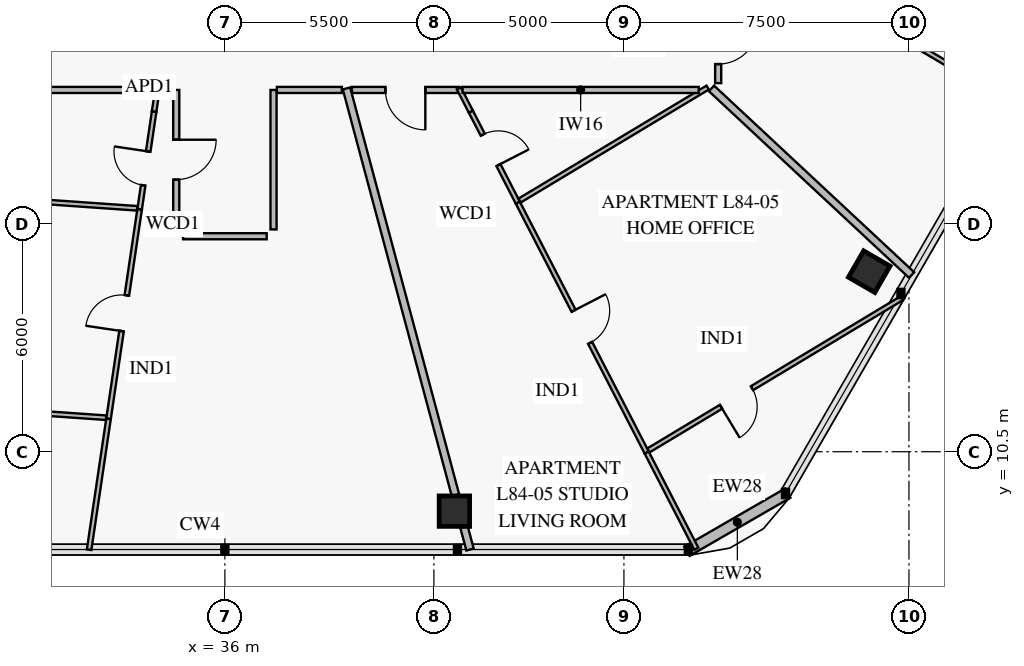
"""IFC4 building model, lengths in metres.
Left out: names, types, materials, properties, quantities, classifications, styles, units other than length and angle.
Written with IfcOpenShell. Run it as: python <this file> out.ifc"""

import sys

from ifc_helpers import new_model, si_unit, direction, frame, frame_2d, origin, origin_2d, place, context, subcontext, project, spatial, rectangle, extrude, element, fill, save


model = new_model("IFC4")
c1 = context("Model", 3, precision=1e-05, world=origin(), true_north=direction((0.0, 1.0)))
c2 = subcontext(c1, "Body", "Model", "MODEL_VIEW")
j1 = project(units=[si_unit("LENGTHUNIT", "METRE"), si_unit("PLANEANGLEUNIT", "RADIAN")], contexts=[c1])
p1 = place(None, origin())
s1 = spatial("IfcSite", under=j1, at=p1, CompositionType="ELEMENT")
p2 = place(p1, origin())
s2 = spatial("IfcBuilding", under=s1, at=p2, CompositionType="ELEMENT")
p3 = place(p2, frame((0.0, 0.0, 331.0)))
s3 = spatial("IfcBuildingStorey", under=s2, at=p3, CompositionType="ELEMENT", Elevation=331.0)
for number, where, z_axis, x_axis in (
    (1, (42.039, 8.936, 0.0), (0.0, 0.0, 1.0), (1.0, 0.0, 0.0)),
    (2, (52.955, 15.238, 0.0), (0.0, 0.0, 1.0), (0.5, 0.866, 0.0)),
):
    element("IfcColumn", number, at=place(p3, frame(where, z_axis=z_axis, x_axis=x_axis)), inside=s3, PredefinedType="COLUMN", context=c2, shape_type="SweptSolid", body=[
        extrude(rectangle(XDim=0.8, YDim=0.8, at=origin_2d()), origin(), (0.0, 0.0, 1.0), 3.55),
    ])
p4 = place(p3, frame((50.811, 9.411, 0.0), z_axis=(0.0, 0.0, 1.0), x_axis=(-0.866023752521, -0.50000286006, 0.0)))
e3 = element("IfcWall", 3, at=p4, inside=s3, PredefinedType="SOLIDWALL", context=c2, shape_type="SweptSolid", body=[
    extrude(rectangle(XDim=3.065, YDim=0.28, at=frame_2d((1.532, 0.0))), origin(), (0.0, 0.0, 1.0), 3.55),
])
p5 = place(p3, frame((34.138, 19.45, 0.0), z_axis=(0.0, 0.0, 1.0), x_axis=(-0.146698230723, -0.989181292334, 0.0)))
e4 = element("IfcWall", 4, at=p5, inside=s3, PredefinedType="PARTITIONING", context=c2, shape_type="SweptSolid", body=[
    extrude(rectangle(XDim=2.603, YDim=0.12, at=frame_2d((1.301, 0.0))), origin(), (0.0, 0.0, 1.0), 3.55),
])
p6 = place(p5, frame((1.06, 0.0, 0.0)))
e5 = element("IfcOpeningElement", 5, at=p6, cuts=e4, PredefinedType="OPENING", context=c2, shape_type="SweptSolid", body=[
    extrude(rectangle(XDim=0.9, YDim=2.1, at=frame_2d((0.45, 1.05))), frame((0.0, 0.072, 0.0), z_axis=(0.0, -1.0, 0.0), x_axis=(1.0, 0.0, 0.0)), (0.0, 0.0, 1.0), 0.144),
])
p7 = place(p3, frame((33.756, 16.875, 0.0), z_axis=(0.0, 0.0, 1.0), x_axis=(-0.146775791573, -0.989169786744, 0.0)))
e6 = element("IfcWall", 6, at=p7, inside=s3, PredefinedType="PARTITIONING", context=c2, shape_type="SweptSolid", body=[
    extrude(rectangle(XDim=5.571, YDim=0.12, at=frame_2d((2.785, 0.0))), origin(), (0.0, 0.0, 1.0), 3.2),
])
p8 = place(p7, frame((2.285, 0.0, 0.0)))
e7 = element("IfcOpeningElement", 7, at=p8, cuts=e6, PredefinedType="OPENING", context=c2, shape_type="SweptSolid", body=[
    extrude(rectangle(XDim=0.95, YDim=2.1, at=frame_2d((0.475, 1.05))), frame((0.0, 0.072, 0.0), z_axis=(0.0, -1.0, 0.0), x_axis=(1.0, 0.0, 0.0)), (0.0, 0.0, 1.0), 0.144),
])
p9 = place(p3, frame((27.512, 11.77, 0.0), z_axis=(0.0, 0.0, 1.0), x_axis=(0.997563205134, -0.06976855856, 0.0)))
e8 = element("IfcWall", 8, at=p9, inside=s3, PredefinedType="PARTITIONING", context=c2, shape_type="SweptSolid", body=[
    extrude(rectangle(XDim=5.375, YDim=0.12, at=frame_2d((2.688, 0.0))), origin(), (0.0, 0.0, 1.0), 3.0),
])
p10 = place(p9, frame((2.297, 0.0, 0.0)))
e9 = element("IfcOpeningElement", 9, at=p10, cuts=e8, PredefinedType="OPENING", context=c2, shape_type="SweptSolid", body=[
    extrude(rectangle(XDim=0.95, YDim=2.1, at=frame_2d((0.475, 1.05))), frame((0.0, 0.072, 0.0), z_axis=(0.0, -1.0, 0.0), x_axis=(1.0, 0.0, 0.0)), (0.0, 0.0, 1.0), 0.144),
])
p11 = place(p3, frame((34.72, 20.02, 0.0), z_axis=(0.0, 0.0, 1.0), x_axis=(0.0, -1.0, 0.0)))
e10 = element("IfcWall", 10, at=p11, inside=s3, PredefinedType="PARTITIONING", context=c2, shape_type="SweptSolid", body=[
    extrude(rectangle(XDim=3.67, YDim=0.16, at=frame_2d((1.835, 0.0))), origin(), (0.0, 0.0, 1.0), 3.55),
])
p12 = place(p11, frame((1.31, 0.0, 0.0)))
e11 = element("IfcOpeningElement", 11, at=p12, cuts=e10, PredefinedType="OPENING", context=c2, shape_type="SweptSolid", body=[
    extrude(rectangle(XDim=1.05, YDim=2.15, at=frame_2d((0.525, 1.075))), frame((0.0, 0.092, 0.0), z_axis=(0.0, -1.0, 0.0), x_axis=(1.0, 0.0, 0.0)), (0.0, 0.0, 1.0), 0.184),
])
p13 = place(p3, frame((42.472, 19.45, 0.0), z_axis=(0.0, 0.0, 1.0), x_axis=(0.458327108515, -0.888783585357, 0.0)))
e12 = element("IfcWall", 12, at=p13, inside=s3, PredefinedType="PARTITIONING", context=c2, shape_type="SweptSolid", body=[
    extrude(rectangle(XDim=2.698, YDim=0.12, at=frame_2d((1.349, 0.0))), origin(), (0.0, 0.0, 1.0), 3.55),
])
p14 = place(p13, frame((0.683, 0.0, 0.0)))
e13 = element("IfcOpeningElement", 13, at=p14, cuts=e12, PredefinedType="OPENING", context=c2, shape_type="SweptSolid", body=[
    extrude(rectangle(XDim=0.9, YDim=2.1, at=frame_2d((0.45, 1.05))), frame((0.0, 0.072, 0.0), z_axis=(0.0, -1.0, 0.0), x_axis=(1.0, 0.0, 0.0)), (0.0, 0.0, 1.0), 0.144),
])
p15 = place(p3, frame((43.708, 17.052, 0.0), z_axis=(0.0, 0.0, 1.0), x_axis=(0.458373868426, -0.888759470692, 0.0)))
e14 = element("IfcWall", 14, at=p15, inside=s3, PredefinedType="PARTITIONING", context=c2, shape_type="SweptSolid", body=[
    extrude(rectangle(XDim=7.397, YDim=0.12, at=frame_2d((3.698, 0.0))), origin(), (0.0, 0.0, 1.0), 2.97),
])
p16 = place(p15, frame((3.198, 0.0, 0.0)))
e15 = element("IfcOpeningElement", 15, at=p16, cuts=e14, PredefinedType="OPENING", context=c2, shape_type="SweptSolid", body=[
    extrude(rectangle(XDim=0.95, YDim=2.1, at=frame_2d((0.475, 1.05))), frame((0.0, 0.072, 0.0), z_axis=(0.0, -1.0, 0.0), x_axis=(1.0, 0.0, 0.0)), (0.0, 0.0, 1.0), 0.144),
])
p17 = place(p3, frame((47.146, 10.535, 0.0), z_axis=(0.0, 0.0, 1.0), x_axis=(0.857151907368, 0.515063692853, 0.0)))
e16 = element("IfcWall", 16, at=p17, inside=s3, PredefinedType="PARTITIONING", context=c2, shape_type="SweptSolid", body=[
    extrude(rectangle(XDim=7.774, YDim=0.12, at=frame_2d((3.887, 0.0))), origin(), (0.0, 0.0, 1.0), 3.55),
])
p18 = place(p17, frame((2.228, 0.0, 0.0)))
e17 = element("IfcOpeningElement", 17, at=p18, cuts=e16, PredefinedType="OPENING", context=c2, shape_type="SweptSolid", body=[
    extrude(rectangle(XDim=0.95, YDim=2.1, at=frame_2d((0.475, 1.05))), frame((0.0, 0.072, 0.0), z_axis=(0.0, -1.0, 0.0), x_axis=(1.0, 0.0, 0.0)), (0.0, 0.0, 1.0), 0.144),
])
p19 = place(p3, frame((39.343, 20.02, 0.0), z_axis=(0.0, 0.0, 1.0), x_axis=(1.0, 0.0, 0.0)))
e18 = element("IfcWall", 18, at=p19, inside=s3, PredefinedType="PARTITIONING", context=c2, shape_type="SweptSolid", body=[
    extrude(rectangle(XDim=2.812, YDim=0.16, at=frame_2d((1.406, 0.0))), origin(), (0.0, 0.0, 1.0), 3.55),
])
p20 = place(p19, frame((0.881, 0.0, 0.0)))
e19 = element("IfcOpeningElement", 19, at=p20, cuts=e18, PredefinedType="OPENING", context=c2, shape_type="SweptSolid", body=[
    extrude(rectangle(XDim=1.05, YDim=2.15, at=frame_2d((0.525, 1.075))), frame((0.0, 0.092, 0.0), z_axis=(0.0, -1.0, 0.0), x_axis=(1.0, 0.0, 0.0)), (0.0, 0.0, 1.0), 0.184),
])
p21 = place(p3, frame((48.214, 24.742, 0.0), z_axis=(0.0, 0.0, 1.0), x_axis=(0.859681622752, -0.510830213968, 0.0)))
e20 = element("IfcWall", 20, at=p21, inside=s3, PredefinedType="PARTITIONING", context=c2, shape_type="SweptSolid", body=[
    extrude(rectangle(XDim=7.218, YDim=0.12, at=frame_2d((3.609, 0.0))), origin(), (0.0, 0.0, 1.0), 3.2),
])
p22 = place(p21, frame((3.109, 0.0, 0.0)))
e21 = element("IfcOpeningElement", 21, at=p22, cuts=e20, PredefinedType="OPENING", context=c2, shape_type="SweptSolid", body=[
    extrude(rectangle(XDim=0.95, YDim=2.1, at=frame_2d((0.475, 1.05))), frame((0.0, 0.072, 0.0), z_axis=(0.0, -1.0, 0.0), x_axis=(1.0, 0.0, 0.0)), (0.0, 0.0, 1.0), 0.144),
])
p23 = place(p3, frame((48.98, 20.2, 0.0), z_axis=(0.0, 0.0, 1.0), x_axis=(0.0, 1.0, 0.0)))
e22 = element("IfcWall", 22, at=p23, inside=s3, PredefinedType="PARTITIONING", context=c2, shape_type="SweptSolid", body=[
    extrude(rectangle(XDim=2.05, YDim=0.16, at=frame_2d((1.025, 0.0))), origin(), (0.0, 0.0, 1.0), 3.55),
])
p24 = place(p23, frame((0.5, 0.0, 0.0)))
e23 = element("IfcOpeningElement", 23, at=p24, cuts=e22, PredefinedType="OPENING", context=c2, shape_type="SweptSolid", body=[
    extrude(rectangle(XDim=1.05, YDim=2.15, at=frame_2d((0.525, 1.075))), frame((0.0, 0.092, 0.0), z_axis=(0.0, -1.0, 0.0), x_axis=(1.0, 0.0, 0.0)), (0.0, 0.0, 1.0), 0.184),
])
p25 = place(p3, frame((34.229, 20.065, 0.0), z_axis=(0.0, 0.0, 1.0), x_axis=(-0.146918808398, -0.989148554939, 0.0)))
e24 = element("IfcWall", 24, at=p25, inside=s3, PredefinedType="PARTITIONING", context=c2, shape_type="SweptSolid", body=[
    extrude(rectangle(XDim=0.622, YDim=0.12, at=frame_2d((0.311, 0.0))), origin(), (0.0, 0.0, 1.0), 3.55),
])
p26 = place(p3, frame((32.938, 11.365, 0.0), z_axis=(0.0, 0.0, 1.0), x_axis=(-0.146828188144, -0.989162010576, 0.0)))
e25 = element("IfcWall", 25, at=p26, inside=s3, PredefinedType="PARTITIONING", context=c2, shape_type="SweptSolid", body=[
    extrude(rectangle(XDim=3.482, YDim=0.12, at=frame_2d((1.741, 0.0))), origin(), (0.0, 0.0, 1.0), 2.97),
])
p27 = place(p3, frame((29.825, 17.175, 0.0), z_axis=(0.0, 0.0, 1.0), x_axis=(0.997561862018, -0.069787760015, 0.0)))
e26 = element("IfcWall", 26, at=p27, inside=s3, PredefinedType="PARTITIONING", context=c2, shape_type="SweptSolid", body=[
    extrude(rectangle(XDim=3.876, YDim=0.12, at=frame_2d((1.938, 0.0))), origin(), (0.0, 0.0, 1.0), 3.0),
])
p28 = place(p3, frame((39.199, 20.06, 0.0), z_axis=(0.0, 0.0, 1.0), x_axis=(0.258819777011, -0.965925630174, 0.0)))
e27 = element("IfcWall", 27, at=p28, inside=s3, PredefinedType="PARTITIONING", context=c2, shape_type="SweptSolid", body=[
    extrude(rectangle(XDim=11.082, YDim=0.2, at=frame_2d((5.541, 0.0))), origin(), (0.0, 0.0, 1.0), 3.0),
])
p29 = place(p3, frame((42.292, 8.516, 0.0), z_axis=(0.0, 0.0, 1.0), x_axis=(0.258955805871, -0.965889170974, 0.0)))
e28 = element("IfcWall", 28, at=p29, inside=s3, PredefinedType="PARTITIONING", context=c2, shape_type="SweptSolid", body=[
    extrude(rectangle(XDim=0.611, YDim=0.2, at=frame_2d((0.305, 0.0))), origin(), (0.0, 0.0, 1.0), 3.55),
])
p30 = place(p3, frame((42.156, 20.062, 0.0), z_axis=(0.0, 0.0, 1.0), x_axis=(0.458236639111, -0.888830232708, 0.0)))
e29 = element("IfcWall", 29, at=p30, inside=s3, PredefinedType="PARTITIONING", context=c2, shape_type="SweptSolid", body=[
    extrude(rectangle(XDim=0.689, YDim=0.12, at=frame_2d((0.344, 0.0))), origin(), (0.0, 0.0, 1.0), 3.55),
])
p31 = place(p3, frame((47.099, 10.478, 0.0), z_axis=(0.0, 0.0, 1.0), x_axis=(0.458284902265, -0.888805348969, 0.0)))
e30 = element("IfcWall", 30, at=p31, inside=s3, PredefinedType="PARTITIONING", context=c2, shape_type="SweptSolid", body=[
    extrude(rectangle(XDim=2.849, YDim=0.12, at=frame_2d((1.425, 0.0))), origin(), (0.0, 0.0, 1.0), 3.55),
])
p32 = place(p3, frame((43.756, 17.109, 0.0), z_axis=(0.0, 0.0, 1.0), x_axis=(0.857171838157, 0.515030523242, 0.0)))
e31 = element("IfcWall", 31, at=p32, inside=s3, PredefinedType="PARTITIONING", context=c2, shape_type="SweptSolid", body=[
    extrude(rectangle(XDim=5.773, YDim=0.12, at=frame_2d((2.886, 0.0))), origin(), (0.0, 0.0, 1.0), 3.0),
])
p33 = place(p3, frame((48.804, 20.06, 0.0), z_axis=(0.0, 0.0, 1.0), x_axis=(0.731343856779, -0.682008917208, 0.0)))
e32 = element("IfcWall", 32, at=p33, inside=s3, PredefinedType="PARTITIONING", context=c2, shape_type="SweptSolid", body=[
    extrude(rectangle(XDim=7.2, YDim=0.2, at=frame_2d((3.6, 0.0))), origin(), (0.0, 0.0, 1.0), 2.97),
])
p34 = place(p3, frame((54.419, 21.055, 0.0), z_axis=(0.0, 0.0, 1.0), x_axis=(0.859699573503, -0.510800003249, 0.0)))
e33 = element("IfcWall", 33, at=p34, inside=s3, PredefinedType="PARTITIONING", context=c2, shape_type="SweptSolid", body=[
    extrude(rectangle(XDim=2.656, YDim=0.12, at=frame_2d((1.328, 0.0))), origin(), (0.0, 0.0, 1.0), 2.97),
])
p35 = place(p3, frame((37.28, 16.35, 0.0), z_axis=(0.0, 0.0, 1.0), x_axis=(0.0, 1.0, 0.0)))
e34 = element("IfcWall", 34, at=p35, inside=s3, PredefinedType="PARTITIONING", context=c2, shape_type="SweptSolid", body=[
    extrude(rectangle(XDim=3.67, YDim=0.16, at=frame_2d((1.835, 0.0))), origin(), (0.0, 0.0, 1.0), 3.55),
])
p36 = place(p3, frame((34.9, 16.17, 0.0), z_axis=(0.0, 0.0, 1.0), x_axis=(1.0, 0.0, 0.0)))
e35 = element("IfcWall", 35, at=p36, inside=s3, PredefinedType="PARTITIONING", context=c2, shape_type="SweptSolid", body=[
    extrude(rectangle(XDim=2.2, YDim=0.16, at=frame_2d((1.1, 0.0))), origin(), (0.0, 0.0, 1.0), 3.55),
])
p37 = place(p3, frame((37.368, 20.02, 0.0), z_axis=(0.0, 0.0, 1.0), x_axis=(1.0, 0.0, 0.0)))
e36 = element("IfcWall", 36, at=p37, inside=s3, PredefinedType="PARTITIONING", context=c2, shape_type="SweptSolid", body=[
    extrude(rectangle(XDim=1.71, YDim=0.16, at=frame_2d((0.855, 0.0))), origin(), (0.0, 0.0, 1.0), 3.0),
])
p38 = place(p3, frame((31.059, 20.02, 0.0), z_axis=(0.0, 0.0, 1.0), x_axis=(1.0, 0.0, 0.0)))
e37 = element("IfcWall", 37, at=p38, inside=s3, PredefinedType="PARTITIONING", context=c2, shape_type="SweptSolid", body=[
    extrude(rectangle(XDim=3.094, YDim=0.16, at=frame_2d((1.547, 0.0))), origin(), (0.0, 0.0, 1.0), 3.0),
])
p39 = place(p3, frame((42.255, 20.02, 0.0), z_axis=(0.0, 0.0, 1.0), x_axis=(1.0, 0.0, 0.0)))
e38 = element("IfcWall", 38, at=p39, inside=s3, PredefinedType="PARTITIONING", context=c2, shape_type="SweptSolid", body=[
    extrude(rectangle(XDim=6.213, YDim=0.16, at=frame_2d((3.107, 0.0))), origin(), (0.0, 0.0, 1.0), 3.0),
])
p40 = place(p6, frame((0.9, 0.0, 0.0), z_axis=(0.0, 0.0, 1.0), x_axis=(-1.0, 0.0, 0.0)))
e39 = element("IfcDoor", 39, at=p40, inside=s3, OperationType="SINGLE_SWING_RIGHT", PredefinedType="DOOR", context=c2, shape_type="SweptSolid", body=[
    extrude(rectangle(XDim=0.9, YDim=2.1, at=frame_2d((0.45, 1.05))), frame((0.0, 0.025, 0.0), z_axis=(0.0, -1.0, 0.0), x_axis=(1.0, 0.0, 0.0)), (0.0, 0.0, 1.0), 0.05),
])
fill(e5, e39)
p41 = place(p8, frame((0.95, 0.0, 0.0), z_axis=(0.0, 0.0, 1.0), x_axis=(-1.0, 0.0, 0.0)))
e40 = element("IfcDoor", 40, at=p41, inside=s3, OperationType="SINGLE_SWING_LEFT", PredefinedType="DOOR", context=c2, shape_type="SweptSolid", body=[
    extrude(rectangle(XDim=0.95, YDim=2.1, at=frame_2d((0.475, 1.05))), frame((0.0, 0.025, 0.0), z_axis=(0.0, -1.0, 0.0), x_axis=(1.0, 0.0, 0.0)), (0.0, 0.0, 1.0), 0.05),
])
fill(e7, e40)
p42 = place(p12, origin())
e41 = element("IfcDoor", 41, at=p42, inside=s3, OperationType="SINGLE_SWING_LEFT", PredefinedType="DOOR", context=c2, shape_type="SweptSolid", body=[
    extrude(rectangle(XDim=1.05, YDim=2.15, at=frame_2d((0.525, 1.075))), frame((0.0, 0.025, 0.0), z_axis=(0.0, -1.0, 0.0), x_axis=(1.0, 0.0, 0.0)), (0.0, 0.0, 1.0), 0.05),
])
fill(e11, e41)
p43 = place(p14, origin())
e42 = element("IfcDoor", 42, at=p43, inside=s3, OperationType="SINGLE_SWING_RIGHT", PredefinedType="DOOR", context=c2, shape_type="SweptSolid", body=[
    extrude(rectangle(XDim=0.9, YDim=2.1, at=frame_2d((0.45, 1.05))), frame((0.0, 0.025, 0.0), z_axis=(0.0, -1.0, 0.0), x_axis=(1.0, 0.0, 0.0)), (0.0, 0.0, 1.0), 0.05),
])
fill(e13, e42)
p44 = place(p16, origin())
e43 = element("IfcDoor", 43, at=p44, inside=s3, OperationType="SINGLE_SWING_LEFT", PredefinedType="DOOR", context=c2, shape_type="SweptSolid", body=[
    extrude(rectangle(XDim=0.95, YDim=2.1, at=frame_2d((0.475, 1.05))), frame((0.0, 0.025, 0.0), z_axis=(0.0, -1.0, 0.0), x_axis=(1.0, 0.0, 0.0)), (0.0, 0.0, 1.0), 0.05),
])
fill(e15, e43)
p45 = place(p18, frame((0.95, 0.0, 0.0), z_axis=(0.0, 0.0, 1.0), x_axis=(-1.0, 0.0, 0.0)))
e44 = element("IfcDoor", 44, at=p45, inside=s3, OperationType="SINGLE_SWING_RIGHT", PredefinedType="DOOR", context=c2, shape_type="SweptSolid", body=[
    extrude(rectangle(XDim=0.95, YDim=2.1, at=frame_2d((0.475, 1.05))), frame((0.0, 0.025, 0.0), z_axis=(0.0, -1.0, 0.0), x_axis=(1.0, 0.0, 0.0)), (0.0, 0.0, 1.0), 0.05),
])
fill(e17, e44)
p46 = place(p20, frame((1.05, 0.0, 0.0), z_axis=(0.0, 0.0, 1.0), x_axis=(-1.0, 0.0, 0.0)))
e45 = element("IfcDoor", 45, at=p46, inside=s3, OperationType="SINGLE_SWING_LEFT", PredefinedType="DOOR", context=c2, shape_type="SweptSolid", body=[
    extrude(rectangle(XDim=1.05, YDim=2.15, at=frame_2d((0.525, 1.075))), frame((0.0, 0.025, 0.0), z_axis=(0.0, -1.0, 0.0), x_axis=(1.0, 0.0, 0.0)), (0.0, 0.0, 1.0), 0.05),
])
fill(e19, e45)
p47 = place(p24, frame((1.05, 0.0, 0.0), z_axis=(0.0, 0.0, 1.0), x_axis=(-1.0, 0.0, 0.0)))
e46 = element("IfcDoor", 46, at=p47, inside=s3, OperationType="SINGLE_SWING_LEFT", PredefinedType="DOOR", context=c2, shape_type="SweptSolid", body=[
    extrude(rectangle(XDim=1.05, YDim=2.15, at=frame_2d((0.525, 1.075))), frame((0.0, 0.025, 0.0), z_axis=(0.0, -1.0, 0.0), x_axis=(1.0, 0.0, 0.0)), (0.0, 0.0, 1.0), 0.05),
])
fill(e23, e46)
save(model, sys.argv[1])
